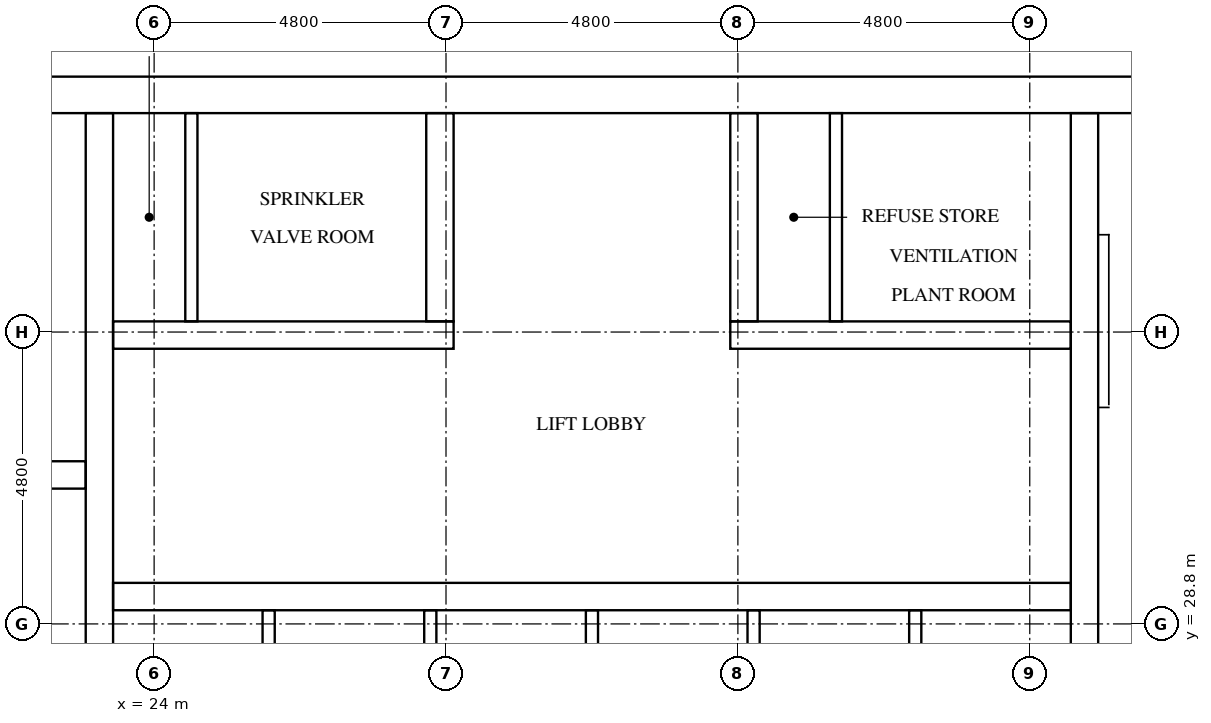
"""IFC4 building model, lengths in metres.
Left out: names, types, materials, properties, quantities, classifications, styles, units other than length and angle.
Written with IfcOpenShell. Run it as: python <this file> out.ifc"""

import sys

from ifc_helpers import new_model, si_unit, direction, frame, frame_2d, origin, place, context, subcontext, project, spatial, rectangle, extrude, element, fill, save


model = new_model("IFC4")
c1 = context("Model", 3, precision=1e-05, world=origin(), true_north=direction((0.0, 1.0)))
c2 = subcontext(c1, "Body", "Model", "MODEL_VIEW")
j1 = project(units=[si_unit("LENGTHUNIT", "METRE"), si_unit("PLANEANGLEUNIT", "RADIAN")], contexts=[c1])
p1 = place(None, origin())
s1 = spatial("IfcSite", under=j1, at=p1, CompositionType="ELEMENT")
p2 = place(p1, origin())
s2 = spatial("IfcBuilding", under=s1, at=p2, CompositionType="ELEMENT")
p3 = place(p2, frame((0.0, 0.0, 245.7)))
s3 = spatial("IfcBuildingStorey", under=s2, at=p3, CompositionType="ELEMENT", Elevation=245.7)
p4 = place(p3, frame((15.0, 37.5, 0.0), z_axis=(0.0, 0.0, 1.0), x_axis=(1.0, 0.0, 0.0)))
e1 = element("IfcWall", 1, at=p4, inside=s3, PredefinedType="SHEAR", context=c2, shape_type="SweptSolid", body=[
    extrude(rectangle(XDim=32.4, YDim=0.6, at=frame_2d((16.2, 0.0))), origin(), (0.0, 0.0, 1.0), 3.2),
])
p5 = place(p4, frame((15.3, 0.0, 0.0)))
e2 = element("IfcOpeningElement", 2, at=p5, cuts=e1, PredefinedType="OPENING", context=c2, shape_type="SweptSolid", body=[
    extrude(rectangle(XDim=1.8, YDim=2.1, at=frame_2d((0.9, 1.05))), frame((0.0, 0.31, 0.0), z_axis=(0.0, -1.0, 0.0), x_axis=(1.0, 0.0, 0.0)), (0.0, 0.0, 1.0), 0.62),
])
p6 = place(p4, frame((1.25, 0.0, 0.0)))
e3 = element("IfcOpeningElement", 3, at=p6, cuts=e1, PredefinedType="OPENING", context=c2, shape_type="SweptSolid", body=[
    extrude(rectangle(XDim=1.0, YDim=2.1, at=frame_2d((0.5, 1.05))), frame((0.0, 0.31, 0.0), z_axis=(0.0, -1.0, 0.0), x_axis=(1.0, 0.0, 0.0)), (0.0, 0.0, 1.0), 0.62),
])
p7 = place(p4, frame((4.988, 0.0, 0.0)))
e4 = element("IfcOpeningElement", 4, at=p7, cuts=e1, PredefinedType="OPENING", context=c2, shape_type="SweptSolid", body=[
    extrude(rectangle(XDim=1.0, YDim=2.1, at=frame_2d((0.5, 1.05))), frame((0.0, 0.31, 0.0), z_axis=(0.0, -1.0, 0.0), x_axis=(1.0, 0.0, 0.0)), (0.0, 0.0, 1.0), 0.62),
])
p8 = place(p3, frame((23.1, 15.6, 0.0), z_axis=(0.0, 0.0, 1.0), x_axis=(0.0, 1.0, 0.0)))
e5 = element("IfcWall", 5, at=p8, inside=s3, PredefinedType="SHEAR", context=c2, shape_type="SweptSolid", body=[
    extrude(rectangle(XDim=21.6, YDim=0.45, at=frame_2d((10.8, 0.0))), origin(), (0.0, 0.0, 1.0), 3.2),
])
p9 = place(p3, frame((39.3, 27.75, 0.0), z_axis=(0.0, 0.0, 1.0), x_axis=(0.0, 1.0, 0.0)))
e6 = element("IfcWall", 6, at=p9, inside=s3, PredefinedType="SHEAR", context=c2, shape_type="SweptSolid", body=[
    extrude(rectangle(XDim=9.45, YDim=0.45, at=frame_2d((4.725, 0.0))), origin(), (0.0, 0.0, 1.0), 3.2),
])
p10 = place(p3, frame((15.6, 31.25, 0.0), z_axis=(0.0, 0.0, 1.0), x_axis=(1.0, 0.0, 0.0)))
e7 = element("IfcWall", 7, at=p10, inside=s3, PredefinedType="SHEAR", context=c2, shape_type="SweptSolid", body=[
    extrude(rectangle(XDim=7.275, YDim=0.45, at=frame_2d((3.637, 0.0))), origin(), (0.0, 0.0, 1.0), 3.2),
])
p11 = place(p3, frame((23.325, 29.25, 0.0), z_axis=(0.0, 0.0, 1.0), x_axis=(1.0, 0.0, 0.0)))
e8 = element("IfcWall", 8, at=p11, inside=s3, PredefinedType="SHEAR", context=c2, shape_type="SweptSolid", body=[
    extrude(rectangle(XDim=15.75, YDim=0.45, at=frame_2d((7.875, 0.0))), origin(), (0.0, 0.0, 1.0), 3.2),
])
p12 = place(p11, frame((0.679, 0.0, 0.0)))
e9 = element("IfcOpeningElement", 9, at=p12, cuts=e8, PredefinedType="OPENING", context=c2, shape_type="SweptSolid", body=[
    extrude(rectangle(XDim=1.1, YDim=2.1, at=frame_2d((0.55, 1.05))), frame((0.0, 0.235, 0.0), z_axis=(0.0, -1.0, 0.0), x_axis=(1.0, 0.0, 0.0)), (0.0, 0.0, 1.0), 0.47),
])
p13 = place(p11, frame((3.337, 0.0, 0.0)))
e10 = element("IfcOpeningElement", 10, at=p13, cuts=e8, PredefinedType="OPENING", context=c2, shape_type="SweptSolid", body=[
    extrude(rectangle(XDim=1.1, YDim=2.1, at=frame_2d((0.55, 1.05))), frame((0.0, 0.235, 0.0), z_axis=(0.0, -1.0, 0.0), x_axis=(1.0, 0.0, 0.0)), (0.0, 0.0, 1.0), 0.47),
])
p14 = place(p11, frame((5.996, 0.0, 0.0)))
e11 = element("IfcOpeningElement", 11, at=p14, cuts=e8, PredefinedType="OPENING", context=c2, shape_type="SweptSolid", body=[
    extrude(rectangle(XDim=1.1, YDim=2.1, at=frame_2d((0.55, 1.05))), frame((0.0, 0.235, 0.0), z_axis=(0.0, -1.0, 0.0), x_axis=(1.0, 0.0, 0.0)), (0.0, 0.0, 1.0), 0.47),
])
p15 = place(p11, frame((8.654, 0.0, 0.0)))
e12 = element("IfcOpeningElement", 12, at=p15, cuts=e8, PredefinedType="OPENING", context=c2, shape_type="SweptSolid", body=[
    extrude(rectangle(XDim=1.1, YDim=2.1, at=frame_2d((0.55, 1.05))), frame((0.0, 0.235, 0.0), z_axis=(0.0, -1.0, 0.0), x_axis=(1.0, 0.0, 0.0)), (0.0, 0.0, 1.0), 0.47),
])
p16 = place(p11, frame((11.312, 0.0, 0.0)))
e13 = element("IfcOpeningElement", 13, at=p16, cuts=e8, PredefinedType="OPENING", context=c2, shape_type="SweptSolid", body=[
    extrude(rectangle(XDim=1.1, YDim=2.1, at=frame_2d((0.55, 1.05))), frame((0.0, 0.235, 0.0), z_axis=(0.0, -1.0, 0.0), x_axis=(1.0, 0.0, 0.0)), (0.0, 0.0, 1.0), 0.47),
])
p17 = place(p11, frame((13.971, 0.0, 0.0)))
e14 = element("IfcOpeningElement", 14, at=p17, cuts=e8, PredefinedType="OPENING", context=c2, shape_type="SweptSolid", body=[
    extrude(rectangle(XDim=1.1, YDim=2.1, at=frame_2d((0.55, 1.05))), frame((0.0, 0.235, 0.0), z_axis=(0.0, -1.0, 0.0), x_axis=(1.0, 0.0, 0.0)), (0.0, 0.0, 1.0), 0.47),
])
p18 = place(p3, frame((23.325, 33.55, 0.0), z_axis=(0.0, 0.0, 1.0), x_axis=(1.0, 0.0, 0.0)))
e15 = element("IfcWall", 15, at=p18, inside=s3, PredefinedType="SHEAR", context=c2, shape_type="SweptSolid", body=[
    extrude(rectangle(XDim=5.6, YDim=0.45, at=frame_2d((2.8, 0.0))), origin(), (0.0, 0.0, 1.0), 3.2),
])
p19 = place(p18, frame((0.094, 0.0, 0.0)))
e16 = element("IfcOpeningElement", 16, at=p19, cuts=e15, PredefinedType="OPENING", context=c2, shape_type="SweptSolid", body=[
    extrude(rectangle(XDim=1.0, YDim=2.1, at=frame_2d((0.5, 1.05))), frame((0.0, 0.235, 0.0), z_axis=(0.0, -1.0, 0.0), x_axis=(1.0, 0.0, 0.0)), (0.0, 0.0, 1.0), 0.47),
])
p20 = place(p18, frame((2.769, 0.0, 0.0)))
e17 = element("IfcOpeningElement", 17, at=p20, cuts=e15, PredefinedType="OPENING", context=c2, shape_type="SweptSolid", body=[
    extrude(rectangle(XDim=1.0, YDim=2.1, at=frame_2d((0.5, 1.05))), frame((0.0, 0.235, 0.0), z_axis=(0.0, -1.0, 0.0), x_axis=(1.0, 0.0, 0.0)), (0.0, 0.0, 1.0), 0.47),
])
p21 = place(p3, frame((33.475, 33.55, 0.0), z_axis=(0.0, 0.0, 1.0), x_axis=(1.0, 0.0, 0.0)))
e18 = element("IfcWall", 18, at=p21, inside=s3, PredefinedType="SHEAR", context=c2, shape_type="SweptSolid", body=[
    extrude(rectangle(XDim=5.6, YDim=0.45, at=frame_2d((2.8, 0.0))), origin(), (0.0, 0.0, 1.0), 3.2),
])
p22 = place(p21, frame((0.544, 0.0, 0.0)))
e19 = element("IfcOpeningElement", 19, at=p22, cuts=e18, PredefinedType="OPENING", context=c2, shape_type="SweptSolid", body=[
    extrude(rectangle(XDim=1.0, YDim=2.1, at=frame_2d((0.5, 1.05))), frame((0.0, 0.235, 0.0), z_axis=(0.0, -1.0, 0.0), x_axis=(1.0, 0.0, 0.0)), (0.0, 0.0, 1.0), 0.47),
])
p23 = place(p21, frame((3.219, 0.0, 0.0)))
e20 = element("IfcOpeningElement", 20, at=p23, cuts=e18, PredefinedType="OPENING", context=c2, shape_type="SweptSolid", body=[
    extrude(rectangle(XDim=1.0, YDim=2.1, at=frame_2d((0.5, 1.05))), frame((0.0, 0.235, 0.0), z_axis=(0.0, -1.0, 0.0), x_axis=(1.0, 0.0, 0.0)), (0.0, 0.0, 1.0), 0.47),
])
for number, where, z_axis, x_axis in (
    (21, (28.7, 33.775, 0.0), (0.0, 0.0, 1.0), (0.0, 1.0, 0.0)),
    (22, (33.7, 33.775, 0.0), (0.0, 0.0, 1.0), (0.0, 1.0, 0.0)),
):
    element("IfcWall", number, at=place(p3, frame(where, z_axis=z_axis, x_axis=x_axis)), inside=s3, PredefinedType="SHEAR", context=c2, shape_type="SweptSolid", body=[
        extrude(rectangle(XDim=3.425, YDim=0.45, at=frame_2d((1.712, 0.0))), origin(), (0.0, 0.0, 1.0), 3.2),
    ])
for number, where, z_axis, x_axis in (
    (23, (25.883, 26.375, 0.0), (0.0, 0.0, 1.0), (0.0, 1.0, 0.0)),
    (24, (28.542, 26.375, 0.0), (0.0, 0.0, 1.0), (0.0, 1.0, 0.0)),
    (25, (31.2, 26.375, 0.0), (0.0, 0.0, 1.0), (0.0, 1.0, 0.0)),
    (26, (33.858, 26.375, 0.0), (0.0, 0.0, 1.0), (0.0, 1.0, 0.0)),
    (27, (36.517, 26.375, 0.0), (0.0, 0.0, 1.0), (0.0, 1.0, 0.0)),
):
    element("IfcWall", number, at=place(p3, frame(where, z_axis=z_axis, x_axis=x_axis)), inside=s3, PredefinedType="SOLIDWALL", context=c2, shape_type="SweptSolid", body=[
        extrude(rectangle(XDim=2.65, YDim=0.2, at=frame_2d((1.325, 0.0))), origin(), (0.0, 0.0, 1.0), 3.2),
    ])
for number, where, z_axis, x_axis in (
    (28, (24.613, 33.775, 0.0), (0.0, 0.0, 1.0), (0.0, 1.0, 0.0)),
    (29, (35.212, 33.775, 0.0), (0.0, 0.0, 1.0), (0.0, 1.0, 0.0)),
):
    element("IfcWall", number, at=place(p3, frame(where, z_axis=z_axis, x_axis=x_axis)), inside=s3, PredefinedType="PARTITIONING", context=c2, shape_type="SweptSolid", body=[
        extrude(rectangle(XDim=3.425, YDim=0.2, at=frame_2d((1.712, 0.0))), origin(), (0.0, 0.0, 1.0), 3.2),
    ])
p24 = place(p12, origin())
e30 = element("IfcDoor", 30, at=p24, inside=s3, OperationType="DOUBLE_DOOR_SLIDING", PredefinedType="DOOR", context=c2, shape_type="SweptSolid", body=[
    extrude(rectangle(XDim=1.1, YDim=2.1, at=frame_2d((0.55, 1.05))), frame((0.0, 0.025, 0.0), z_axis=(0.0, -1.0, 0.0), x_axis=(1.0, 0.0, 0.0)), (0.0, 0.0, 1.0), 0.05),
])
fill(e9, e30)
p25 = place(p13, origin())
e31 = element("IfcDoor", 31, at=p25, inside=s3, OperationType="DOUBLE_DOOR_SLIDING", PredefinedType="DOOR", context=c2, shape_type="SweptSolid", body=[
    extrude(rectangle(XDim=1.1, YDim=2.1, at=frame_2d((0.55, 1.05))), frame((0.0, 0.025, 0.0), z_axis=(0.0, -1.0, 0.0), x_axis=(1.0, 0.0, 0.0)), (0.0, 0.0, 1.0), 0.05),
])
fill(e10, e31)
p26 = place(p14, origin())
e32 = element("IfcDoor", 32, at=p26, inside=s3, OperationType="DOUBLE_DOOR_SLIDING", PredefinedType="DOOR", context=c2, shape_type="SweptSolid", body=[
    extrude(rectangle(XDim=1.1, YDim=2.1, at=frame_2d((0.55, 1.05))), frame((0.0, 0.025, 0.0), z_axis=(0.0, -1.0, 0.0), x_axis=(1.0, 0.0, 0.0)), (0.0, 0.0, 1.0), 0.05),
])
fill(e11, e32)
p27 = place(p15, origin())
e33 = element("IfcDoor", 33, at=p27, inside=s3, OperationType="DOUBLE_DOOR_SLIDING", PredefinedType="DOOR", context=c2, shape_type="SweptSolid", body=[
    extrude(rectangle(XDim=1.1, YDim=2.1, at=frame_2d((0.55, 1.05))), frame((0.0, 0.025, 0.0), z_axis=(0.0, -1.0, 0.0), x_axis=(1.0, 0.0, 0.0)), (0.0, 0.0, 1.0), 0.05),
])
fill(e12, e33)
p28 = place(p16, origin())
e34 = element("IfcDoor", 34, at=p28, inside=s3, OperationType="DOUBLE_DOOR_SLIDING", PredefinedType="DOOR", context=c2, shape_type="SweptSolid", body=[
    extrude(rectangle(XDim=1.1, YDim=2.1, at=frame_2d((0.55, 1.05))), frame((0.0, 0.025, 0.0), z_axis=(0.0, -1.0, 0.0), x_axis=(1.0, 0.0, 0.0)), (0.0, 0.0, 1.0), 0.05),
])
fill(e13, e34)
p29 = place(p17, origin())
e35 = element("IfcDoor", 35, at=p29, inside=s3, OperationType="DOUBLE_DOOR_SLIDING", PredefinedType="DOOR", context=c2, shape_type="SweptSolid", body=[
    extrude(rectangle(XDim=1.1, YDim=2.1, at=frame_2d((0.55, 1.05))), frame((0.0, 0.025, 0.0), z_axis=(0.0, -1.0, 0.0), x_axis=(1.0, 0.0, 0.0)), (0.0, 0.0, 1.0), 0.05),
])
fill(e14, e35)
p30 = place(p5, origin())
e36 = element("IfcDoor", 36, at=p30, inside=s3, OperationType="DOUBLE_DOOR_SINGLE_SWING", PredefinedType="DOOR", context=c2, shape_type="SweptSolid", body=[
    extrude(rectangle(XDim=1.8, YDim=2.1, at=frame_2d((0.9, 1.05))), frame((0.0, 0.025, 0.0), z_axis=(0.0, -1.0, 0.0), x_axis=(1.0, 0.0, 0.0)), (0.0, 0.0, 1.0), 0.05),
])
fill(e2, e36)
p31 = place(p19, frame((1.0, 0.0, 0.0), z_axis=(0.0, 0.0, 1.0), x_axis=(-1.0, 0.0, 0.0)))
e37 = element("IfcDoor", 37, at=p31, inside=s3, OperationType="SINGLE_SWING_LEFT", PredefinedType="DOOR", context=c2, shape_type="SweptSolid", body=[
    extrude(rectangle(XDim=1.0, YDim=2.1, at=frame_2d((0.5, 1.05))), frame((0.0, 0.025, 0.0), z_axis=(0.0, -1.0, 0.0), x_axis=(1.0, 0.0, 0.0)), (0.0, 0.0, 1.0), 0.05),
])
fill(e16, e37)
p32 = place(p20, frame((1.0, 0.0, 0.0), z_axis=(0.0, 0.0, 1.0), x_axis=(-1.0, 0.0, 0.0)))
e38 = element("IfcDoor", 38, at=p32, inside=s3, OperationType="SINGLE_SWING_RIGHT", PredefinedType="DOOR", context=c2, shape_type="SweptSolid", body=[
    extrude(rectangle(XDim=1.0, YDim=2.1, at=frame_2d((0.5, 1.05))), frame((0.0, 0.025, 0.0), z_axis=(0.0, -1.0, 0.0), x_axis=(1.0, 0.0, 0.0)), (0.0, 0.0, 1.0), 0.05),
])
fill(e17, e38)
p33 = place(p22, frame((1.0, 0.0, 0.0), z_axis=(0.0, 0.0, 1.0), x_axis=(-1.0, 0.0, 0.0)))
e39 = element("IfcDoor", 39, at=p33, inside=s3, OperationType="SINGLE_SWING_LEFT", PredefinedType="DOOR", context=c2, shape_type="SweptSolid", body=[
    extrude(rectangle(XDim=1.0, YDim=2.1, at=frame_2d((0.5, 1.05))), frame((0.0, 0.025, 0.0), z_axis=(0.0, -1.0, 0.0), x_axis=(1.0, 0.0, 0.0)), (0.0, 0.0, 1.0), 0.05),
])
fill(e19, e39)
p34 = place(p23, frame((1.0, 0.0, 0.0), z_axis=(0.0, 0.0, 1.0), x_axis=(-1.0, 0.0, 0.0)))
e40 = element("IfcDoor", 40, at=p34, inside=s3, OperationType="SINGLE_SWING_RIGHT", PredefinedType="DOOR", context=c2, shape_type="SweptSolid", body=[
    extrude(rectangle(XDim=1.0, YDim=2.1, at=frame_2d((0.5, 1.05))), frame((0.0, 0.025, 0.0), z_axis=(0.0, -1.0, 0.0), x_axis=(1.0, 0.0, 0.0)), (0.0, 0.0, 1.0), 0.05),
])
fill(e20, e40)
save(model, sys.argv[1])
